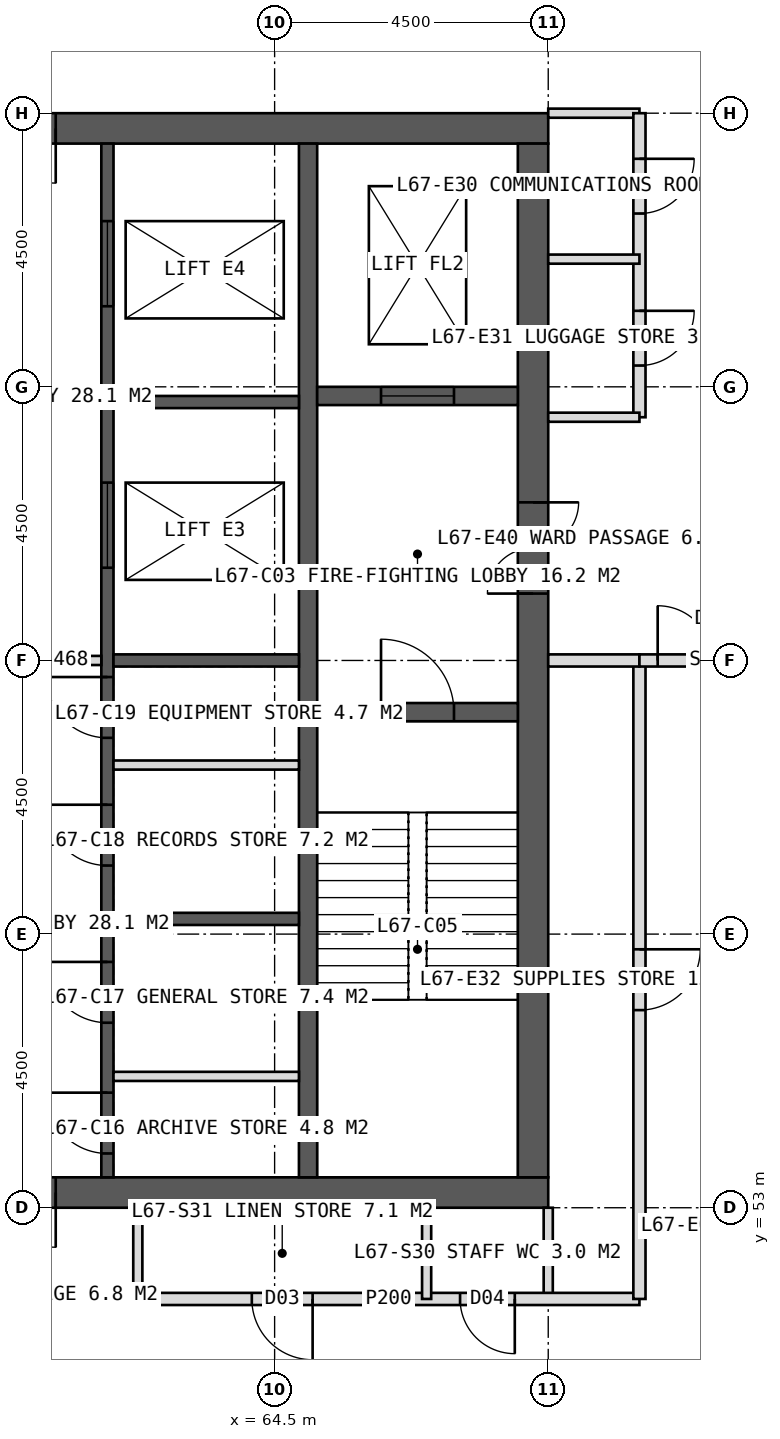
"""IFC4 building model, lengths in metres.
Left out: names, types, materials, properties, quantities, classifications, styles, units other than length and angle.
Written with IfcOpenShell. Run it as: python <this file> out.ifc"""

import sys

from ifc_helpers import new_model, si_unit, direction, frame, frame_2d, origin, place, context, subcontext, project, spatial, rectangle, extrude, element, fill, save


model = new_model("IFC4")
c1 = context("Model", 3, precision=1e-05, world=origin(), true_north=direction((0.0, 1.0)))
c2 = subcontext(c1, "Body", "Model", "MODEL_VIEW")
j1 = project(units=[si_unit("LENGTHUNIT", "METRE"), si_unit("PLANEANGLEUNIT", "RADIAN")], contexts=[c1])
p1 = place(None, origin())
s1 = spatial("IfcSite", under=j1, at=p1, CompositionType="ELEMENT")
p2 = place(p1, origin())
s2 = spatial("IfcBuilding", under=s1, at=p2, CompositionType="ELEMENT")
p3 = place(p2, frame((0.0, 0.0, 278.0)))
s3 = spatial("IfcBuildingStorey", under=s2, at=p3, CompositionType="ELEMENT", Elevation=278.0)
p4 = place(p3, frame((51.0, 70.75, 0.0), z_axis=(0.0, 0.0, 1.0), x_axis=(1.0, 0.0, 0.0)))
e1 = element("IfcWall", 1, at=p4, inside=s3, PredefinedType="SHEAR", context=c2, shape_type="SweptSolid", body=[
    extrude(rectangle(XDim=18.0, YDim=0.5, at=frame_2d((9.0, 0.0))), origin(), (0.0, 0.0, 1.0), 4.0),
])
p5 = place(p4, frame((8.1, 0.0, 0.0)))
e2 = element("IfcOpeningElement", 2, at=p5, cuts=e1, PredefinedType="OPENING", context=c2, shape_type="SweptSolid", body=[
    extrude(rectangle(XDim=1.8, YDim=2.2, at=frame_2d((0.9, 1.1))), frame((0.0, 0.26, 0.0), z_axis=(0.0, -1.0, 0.0), x_axis=(1.0, 0.0, 0.0)), (0.0, 0.0, 1.0), 0.52),
])
p6 = place(p3, frame((51.0, 53.25, 0.0), z_axis=(0.0, 0.0, 1.0), x_axis=(1.0, 0.0, 0.0)))
e3 = element("IfcWall", 3, at=p6, inside=s3, PredefinedType="SHEAR", context=c2, shape_type="SweptSolid", body=[
    extrude(rectangle(XDim=18.0, YDim=0.5, at=frame_2d((9.0, 0.0))), origin(), (0.0, 0.0, 1.0), 4.0),
])
p7 = place(p6, frame((8.1, 0.0, 0.0)))
e4 = element("IfcOpeningElement", 4, at=p7, cuts=e3, PredefinedType="OPENING", context=c2, shape_type="SweptSolid", body=[
    extrude(rectangle(XDim=1.8, YDim=2.2, at=frame_2d((0.9, 1.1))), frame((0.0, 0.26, 0.0), z_axis=(0.0, -1.0, 0.0), x_axis=(1.0, 0.0, 0.0)), (0.0, 0.0, 1.0), 0.52),
])
p8 = place(p3, frame((68.75, 53.5, 0.0), z_axis=(0.0, 0.0, 1.0), x_axis=(0.0, 1.0, 0.0)))
e5 = element("IfcWall", 5, at=p8, inside=s3, PredefinedType="SHEAR", context=c2, shape_type="SweptSolid", body=[
    extrude(rectangle(XDim=17.0, YDim=0.5, at=frame_2d((8.5, 0.0))), origin(), (0.0, 0.0, 1.0), 4.0),
])
p9 = place(p8, frame((9.6, 0.0, 0.0)))
e6 = element("IfcOpeningElement", 6, at=p9, cuts=e5, PredefinedType="OPENING", context=c2, shape_type="SweptSolid", body=[
    extrude(rectangle(XDim=1.5, YDim=2.2, at=frame_2d((0.75, 1.1))), frame((0.0, 0.26, 0.0), z_axis=(0.0, -1.0, 0.0), x_axis=(1.0, 0.0, 0.0)), (0.0, 0.0, 1.0), 0.52),
])
p10 = place(p3, frame((65.05, 53.5, 0.0), z_axis=(0.0, 0.0, 1.0), x_axis=(0.0, 1.0, 0.0)))
e7 = element("IfcWall", 7, at=p10, inside=s3, PredefinedType="SHEAR", context=c2, shape_type="SweptSolid", body=[
    extrude(rectangle(XDim=17.0, YDim=0.3, at=frame_2d((8.5, 0.0))), origin(), (0.0, 0.0, 1.0), 4.0),
])
p11 = place(p3, frame((61.75, 53.5, 0.0), z_axis=(0.0, 0.0, 1.0), x_axis=(0.0, 1.0, 0.0)))
e8 = element("IfcWall", 8, at=p11, inside=s3, PredefinedType="SHEAR", context=c2, shape_type="SweptSolid", body=[
    extrude(rectangle(XDim=17.0, YDim=0.2, at=frame_2d((8.5, 0.0))), origin(), (0.0, 0.0, 1.0), 4.0),
])
p12 = place(p11, frame((0.393, 0.0, 0.0)))
e9 = element("IfcOpeningElement", 9, at=p12, cuts=e8, PredefinedType="OPENING", context=c2, shape_type="SweptSolid", body=[
    extrude(rectangle(XDim=1.0, YDim=2.1, at=frame_2d((0.5, 1.05))), frame((0.0, 0.11, 0.0), z_axis=(0.0, -1.0, 0.0), x_axis=(1.0, 0.0, 0.0)), (0.0, 0.0, 1.0), 0.22),
])
p13 = place(p11, frame((2.542, 0.0, 0.0)))
e10 = element("IfcOpeningElement", 10, at=p13, cuts=e8, PredefinedType="OPENING", context=c2, shape_type="SweptSolid", body=[
    extrude(rectangle(XDim=1.0, YDim=2.1, at=frame_2d((0.5, 1.05))), frame((0.0, 0.11, 0.0), z_axis=(0.0, -1.0, 0.0), x_axis=(1.0, 0.0, 0.0)), (0.0, 0.0, 1.0), 0.22),
])
p14 = place(p11, frame((5.127, 0.0, 0.0)))
e11 = element("IfcOpeningElement", 11, at=p14, cuts=e8, PredefinedType="OPENING", context=c2, shape_type="SweptSolid", body=[
    extrude(rectangle(XDim=1.0, YDim=2.1, at=frame_2d((0.5, 1.05))), frame((0.0, 0.11, 0.0), z_axis=(0.0, -1.0, 0.0), x_axis=(1.0, 0.0, 0.0)), (0.0, 0.0, 1.0), 0.22),
])
p15 = place(p11, frame((7.228, 0.0, 0.0)))
e12 = element("IfcOpeningElement", 12, at=p15, cuts=e8, PredefinedType="OPENING", context=c2, shape_type="SweptSolid", body=[
    extrude(rectangle(XDim=1.0, YDim=2.1, at=frame_2d((0.5, 1.05))), frame((0.0, 0.11, 0.0), z_axis=(0.0, -1.0, 0.0), x_axis=(1.0, 0.0, 0.0)), (0.0, 0.0, 1.0), 0.22),
])
p16 = place(p11, frame((10.025, 0.0, 0.0)))
e13 = element("IfcOpeningElement", 13, at=p16, cuts=e8, PredefinedType="OPENING", context=c2, shape_type="SweptSolid", body=[
    extrude(rectangle(XDim=1.4, YDim=2.2, at=frame_2d((0.7, 1.1))), frame((0.0, 0.11, 0.0), z_axis=(0.0, -1.0, 0.0), x_axis=(1.0, 0.0, 0.0)), (0.0, 0.0, 1.0), 0.22),
])
p17 = place(p11, frame((14.325, 0.0, 0.0)))
e14 = element("IfcOpeningElement", 14, at=p17, cuts=e8, PredefinedType="OPENING", context=c2, shape_type="SweptSolid", body=[
    extrude(rectangle(XDim=1.4, YDim=2.2, at=frame_2d((0.7, 1.1))), frame((0.0, 0.11, 0.0), z_axis=(0.0, -1.0, 0.0), x_axis=(1.0, 0.0, 0.0)), (0.0, 0.0, 1.0), 0.22),
])
for number, where, z_axis, x_axis in (
    (15, (61.85, 57.75, 0.0), (0.0, 0.0, 1.0), (1.0, 0.0, 0.0)),
    (16, (61.85, 62.0, 0.0), (0.0, 0.0, 1.0), (1.0, 0.0, 0.0)),
    (17, (61.85, 66.25, 0.0), (0.0, 0.0, 1.0), (1.0, 0.0, 0.0)),
):
    element("IfcWall", number, at=place(p3, frame(where, z_axis=z_axis, x_axis=x_axis)), inside=s3, PredefinedType="SHEAR", context=c2, shape_type="SweptSolid", body=[
        extrude(rectangle(XDim=3.05, YDim=0.2, at=frame_2d((1.525, 0.0))), origin(), (0.0, 0.0, 1.0), 4.0),
    ])
p18 = place(p3, frame((65.2, 61.15, 0.0), z_axis=(0.0, 0.0, 1.0), x_axis=(1.0, 0.0, 0.0)))
e18 = element("IfcWall", 18, at=p18, inside=s3, PredefinedType="SHEAR", context=c2, shape_type="SweptSolid", body=[
    extrude(rectangle(XDim=3.3, YDim=0.3, at=frame_2d((1.65, 0.0))), origin(), (0.0, 0.0, 1.0), 4.0),
])
p19 = place(p18, frame((1.05, 0.0, 0.0)))
e19 = element("IfcOpeningElement", 19, at=p19, cuts=e18, PredefinedType="OPENING", context=c2, shape_type="SweptSolid", body=[
    extrude(rectangle(XDim=1.2, YDim=2.1, at=frame_2d((0.6, 1.05))), frame((0.0, 0.16, 0.0), z_axis=(0.0, -1.0, 0.0), x_axis=(1.0, 0.0, 0.0)), (0.0, 0.0, 1.0), 0.32),
])
p20 = place(p3, frame((65.2, 66.35, 0.0), z_axis=(0.0, 0.0, 1.0), x_axis=(1.0, 0.0, 0.0)))
e20 = element("IfcWall", 20, at=p20, inside=s3, PredefinedType="SHEAR", context=c2, shape_type="SweptSolid", body=[
    extrude(rectangle(XDim=3.3, YDim=0.3, at=frame_2d((1.65, 0.0))), origin(), (0.0, 0.0, 1.0), 4.0),
])
p21 = place(p20, frame((1.05, 0.0, 0.0)))
e21 = element("IfcOpeningElement", 21, at=p21, cuts=e20, PredefinedType="OPENING", context=c2, shape_type="SweptSolid", body=[
    extrude(rectangle(XDim=1.2, YDim=2.2, at=frame_2d((0.6, 1.1))), frame((0.0, 0.16, 0.0), z_axis=(0.0, -1.0, 0.0), x_axis=(1.0, 0.0, 0.0)), (0.0, 0.0, 1.0), 0.32),
])
p22 = place(p3, frame((69.0, 53.0, 0.0), z_axis=(0.0, 0.0, 1.0), x_axis=(0.0, -1.0, 0.0)))
e22 = element("IfcWall", 22, at=p22, inside=s3, PredefinedType="PARTITIONING", context=c2, shape_type="SweptSolid", body=[
    extrude(rectangle(XDim=1.5, YDim=0.15, at=frame_2d((0.75, 0.0))), origin(), (0.0, 0.0, 1.0), 3.75),
])
p23 = place(p3, frame((70.5, 51.5, 0.0), z_axis=(0.0, 0.0, 1.0), x_axis=(-1.0, 0.0, 0.0)))
e23 = element("IfcWall", 23, at=p23, inside=s3, PredefinedType="PARTITIONING", context=c2, shape_type="SweptSolid", body=[
    extrude(rectangle(XDim=8.25, YDim=0.2, at=frame_2d((4.125, 0.0))), origin(), (0.0, 0.0, 1.0), 3.75),
])
p24 = place(p23, frame((2.05, 0.0, 0.0)))
e24 = element("IfcOpeningElement", 24, at=p24, cuts=e23, PredefinedType="OPENING", context=c2, shape_type="SweptSolid", body=[
    extrude(rectangle(XDim=0.9, YDim=2.1, at=frame_2d((0.45, 1.05))), frame((0.0, 0.11, 0.0), z_axis=(0.0, -1.0, 0.0), x_axis=(1.0, 0.0, 0.0)), (0.0, 0.0, 1.0), 0.22),
])
p25 = place(p23, frame((5.375, 0.0, 0.0)))
e25 = element("IfcOpeningElement", 25, at=p25, cuts=e23, PredefinedType="OPENING", context=c2, shape_type="SweptSolid", body=[
    extrude(rectangle(XDim=1.0, YDim=2.1, at=frame_2d((0.5, 1.05))), frame((0.0, 0.11, 0.0), z_axis=(0.0, -1.0, 0.0), x_axis=(1.0, 0.0, 0.0)), (0.0, 0.0, 1.0), 0.22),
])
for number, where, z_axis, x_axis in (
    (26, (62.25, 53.0, 0.0), (0.0, 0.0, 1.0), (0.0, -1.0, 0.0)),
    (27, (67.0, 53.0, 0.0), (0.0, 0.0, 1.0), (0.0, -1.0, 0.0)),
    (28, (69.0, 71.0, 0.0), (0.0, 0.0, 1.0), (1.0, 0.0, 0.0)),
):
    element("IfcWall", number, at=place(p3, frame(where, z_axis=z_axis, x_axis=x_axis)), inside=s3, PredefinedType="PARTITIONING", context=c2, shape_type="SweptSolid", body=[
        extrude(rectangle(XDim=1.5, YDim=0.15, at=frame_2d((0.75, 0.0))), origin(), (0.0, 0.0, 1.0), 3.75),
    ])
p26 = place(p3, frame((70.5, 71.0, 0.0), z_axis=(0.0, 0.0, 1.0), x_axis=(0.0, -1.0, 0.0)))
e29 = element("IfcWall", 29, at=p26, inside=s3, PredefinedType="PARTITIONING", context=c2, shape_type="SweptSolid", body=[
    extrude(rectangle(XDim=5.0, YDim=0.2, at=frame_2d((2.5, 0.0))), origin(), (0.0, 0.0, 1.0), 3.75),
])
p27 = place(p26, frame((0.75, 0.0, 0.0)))
e30 = element("IfcOpeningElement", 30, at=p27, cuts=e29, PredefinedType="OPENING", context=c2, shape_type="SweptSolid", body=[
    extrude(rectangle(XDim=0.9, YDim=2.1, at=frame_2d((0.45, 1.05))), frame((0.0, 0.11, 0.0), z_axis=(0.0, -1.0, 0.0), x_axis=(1.0, 0.0, 0.0)), (0.0, 0.0, 1.0), 0.22),
])
p28 = place(p26, frame((3.25, 0.0, 0.0)))
e31 = element("IfcOpeningElement", 31, at=p28, cuts=e29, PredefinedType="OPENING", context=c2, shape_type="SweptSolid", body=[
    extrude(rectangle(XDim=0.9, YDim=2.1, at=frame_2d((0.45, 1.05))), frame((0.0, 0.11, 0.0), z_axis=(0.0, -1.0, 0.0), x_axis=(1.0, 0.0, 0.0)), (0.0, 0.0, 1.0), 0.22),
])
p29 = place(p3, frame((70.5, 62.0, 0.0), z_axis=(0.0, 0.0, 1.0), x_axis=(0.0, -1.0, 0.0)))
e32 = element("IfcWall", 32, at=p29, inside=s3, PredefinedType="PARTITIONING", context=c2, shape_type="SweptSolid", body=[
    extrude(rectangle(XDim=10.5, YDim=0.2, at=frame_2d((5.25, 0.0))), origin(), (0.0, 0.0, 1.0), 3.75),
])
p30 = place(p29, frame((4.75, 0.0, 0.0)))
e33 = element("IfcOpeningElement", 33, at=p30, cuts=e32, PredefinedType="OPENING", context=c2, shape_type="SweptSolid", body=[
    extrude(rectangle(XDim=1.0, YDim=2.1, at=frame_2d((0.5, 1.05))), frame((0.0, 0.11, 0.0), z_axis=(0.0, -1.0, 0.0), x_axis=(1.0, 0.0, 0.0)), (0.0, 0.0, 1.0), 0.22),
])
p31 = place(p3, frame((69.0, 66.0, 0.0), z_axis=(0.0, 0.0, 1.0), x_axis=(1.0, 0.0, 0.0)))
e34 = element("IfcWall", 34, at=p31, inside=s3, PredefinedType="PARTITIONING", context=c2, shape_type="SweptSolid", body=[
    extrude(rectangle(XDim=1.5, YDim=0.15, at=frame_2d((0.75, 0.0))), origin(), (0.0, 0.0, 1.0), 3.75),
])
p32 = place(p3, frame((69.0, 62.0, 0.0), z_axis=(0.0, 0.0, 1.0), x_axis=(1.0, 0.0, 0.0)))
e35 = element("IfcWall", 35, at=p32, inside=s3, PredefinedType="SOLIDWALL", context=c2, shape_type="SweptSolid", body=[
    extrude(rectangle(XDim=1.5, YDim=0.2, at=frame_2d((0.75, 0.0))), origin(), (0.0, 0.0, 1.0), 2.75),
])
p33 = place(p3, frame((69.0, 68.6, 0.0), z_axis=(0.0, 0.0, 1.0), x_axis=(1.0, 0.0, 0.0)))
e36 = element("IfcWall", 36, at=p33, inside=s3, PredefinedType="PARTITIONING", context=c2, shape_type="SweptSolid", body=[
    extrude(rectangle(XDim=1.5, YDim=0.15, at=frame_2d((0.75, 0.0))), origin(), (0.0, 0.0, 1.0), 3.75),
])
p34 = place(p3, frame((70.5, 62.0, 0.0), z_axis=(0.0, 0.0, 1.0), x_axis=(1.0, 0.0, 0.0)))
e37 = element("IfcWall", 37, at=p34, inside=s3, PredefinedType="SOLIDWALL", context=c2, shape_type="SweptSolid", body=[
    extrude(rectangle(XDim=2.6, YDim=0.2, at=frame_2d((1.3, 0.0))), origin(), (0.0, 0.0, 1.0), 2.75),
])
p35 = place(p34, frame((0.3, 0.0, 0.0)))
e38 = element("IfcOpeningElement", 38, at=p35, cuts=e37, PredefinedType="OPENING", context=c2, shape_type="SweptSolid", body=[
    extrude(rectangle(XDim=1.8, YDim=2.2, at=frame_2d((0.9, 1.1))), frame((0.0, 0.11, 0.0), z_axis=(0.0, -1.0, 0.0), x_axis=(1.0, 0.0, 0.0)), (0.0, 0.0, 1.0), 0.22),
])
for number, where, z_axis, x_axis in (
    (39, (61.85, 55.16, 0.0), (0.0, 0.0, 1.0), (1.0, 0.0, 0.0)),
    (40, (61.85, 60.28, 0.0), (0.0, 0.0, 1.0), (1.0, 0.0, 0.0)),
):
    element("IfcWall", number, at=place(p3, frame(where, z_axis=z_axis, x_axis=x_axis)), inside=s3, PredefinedType="PARTITIONING", context=c2, shape_type="SweptSolid", body=[
        extrude(rectangle(XDim=3.05, YDim=0.15, at=frame_2d((1.525, 0.0))), origin(), (0.0, 0.0, 1.0), 3.75),
    ])
p36 = place(p3, frame((58.35, 62.0, 0.0), z_axis=(0.0, 0.0, 1.0), x_axis=(1.0, 0.0, 0.0)))
e41 = element("IfcWall", 41, at=p36, inside=s3, PredefinedType="PARTITIONING", context=c2, shape_type="SweptSolid", body=[
    extrude(rectangle(XDim=3.3, YDim=0.15, at=frame_2d((1.65, 0.0))), origin(), (0.0, 0.0, 1.0), 3.75),
])
p37 = place(p24, origin())
e42 = element("IfcDoor", 42, at=p37, inside=s3, OperationType="SINGLE_SWING_LEFT", PredefinedType="DOOR", context=c2, shape_type="SweptSolid", body=[
    extrude(rectangle(XDim=0.9, YDim=2.1, at=frame_2d((0.45, 1.05))), frame((0.0, 0.025, 0.0), z_axis=(0.0, -1.0, 0.0), x_axis=(1.0, 0.0, 0.0)), (0.0, 0.0, 1.0), 0.05),
])
fill(e24, e42)
p38 = place(p25, origin())
e43 = element("IfcDoor", 43, at=p38, inside=s3, OperationType="SINGLE_SWING_LEFT", PredefinedType="DOOR", context=c2, shape_type="SweptSolid", body=[
    extrude(rectangle(XDim=1.0, YDim=2.1, at=frame_2d((0.5, 1.05))), frame((0.0, 0.025, 0.0), z_axis=(0.0, -1.0, 0.0), x_axis=(1.0, 0.0, 0.0)), (0.0, 0.0, 1.0), 0.05),
])
fill(e25, e43)
p39 = place(p27, origin())
e44 = element("IfcDoor", 44, at=p39, inside=s3, OperationType="SINGLE_SWING_LEFT", PredefinedType="DOOR", context=c2, shape_type="SweptSolid", body=[
    extrude(rectangle(XDim=0.9, YDim=2.1, at=frame_2d((0.45, 1.05))), frame((0.0, 0.025, 0.0), z_axis=(0.0, -1.0, 0.0), x_axis=(1.0, 0.0, 0.0)), (0.0, 0.0, 1.0), 0.05),
])
fill(e30, e44)
p40 = place(p28, origin())
e45 = element("IfcDoor", 45, at=p40, inside=s3, OperationType="SINGLE_SWING_LEFT", PredefinedType="DOOR", context=c2, shape_type="SweptSolid", body=[
    extrude(rectangle(XDim=0.9, YDim=2.1, at=frame_2d((0.45, 1.05))), frame((0.0, 0.025, 0.0), z_axis=(0.0, -1.0, 0.0), x_axis=(1.0, 0.0, 0.0)), (0.0, 0.0, 1.0), 0.05),
])
fill(e31, e45)
p41 = place(p30, origin())
e46 = element("IfcDoor", 46, at=p41, inside=s3, OperationType="SINGLE_SWING_LEFT", PredefinedType="DOOR", context=c2, shape_type="SweptSolid", body=[
    extrude(rectangle(XDim=1.0, YDim=2.1, at=frame_2d((0.5, 1.05))), frame((0.0, 0.025, 0.0), z_axis=(0.0, -1.0, 0.0), x_axis=(1.0, 0.0, 0.0)), (0.0, 0.0, 1.0), 0.05),
])
fill(e33, e46)
p42 = place(p35, origin())
e47 = element("IfcDoor", 47, at=p42, inside=s3, OperationType="DOUBLE_DOOR_DOUBLE_SWING", PredefinedType="DOOR", context=c2, shape_type="SweptSolid", body=[
    extrude(rectangle(XDim=1.8, YDim=2.2, at=frame_2d((0.9, 1.1))), frame((0.0, 0.025, 0.0), z_axis=(0.0, -1.0, 0.0), x_axis=(1.0, 0.0, 0.0)), (0.0, 0.0, 1.0), 0.05),
])
fill(e38, e47)
p43 = place(p5, origin())
e48 = element("IfcDoor", 48, at=p43, inside=s3, OperationType="DOUBLE_DOOR_SINGLE_SWING", PredefinedType="DOOR", context=c2, shape_type="SweptSolid", body=[
    extrude(rectangle(XDim=1.8, YDim=2.2, at=frame_2d((0.9, 1.1))), frame((0.0, 0.025, 0.0), z_axis=(0.0, -1.0, 0.0), x_axis=(1.0, 0.0, 0.0)), (0.0, 0.0, 1.0), 0.05),
])
fill(e2, e48)
p44 = place(p9, origin())
e49 = element("IfcDoor", 49, at=p44, inside=s3, OperationType="DOUBLE_DOOR_SINGLE_SWING", PredefinedType="DOOR", context=c2, shape_type="SweptSolid", body=[
    extrude(rectangle(XDim=1.5, YDim=2.2, at=frame_2d((0.75, 1.1))), frame((0.0, 0.025, 0.0), z_axis=(0.0, -1.0, 0.0), x_axis=(1.0, 0.0, 0.0)), (0.0, 0.0, 1.0), 0.05),
])
fill(e6, e49)
p45 = place(p19, origin())
e50 = element("IfcDoor", 50, at=p45, inside=s3, OperationType="SINGLE_SWING_LEFT", PredefinedType="DOOR", context=c2, shape_type="SweptSolid", body=[
    extrude(rectangle(XDim=1.2, YDim=2.1, at=frame_2d((0.6, 1.05))), frame((0.0, 0.025, 0.0), z_axis=(0.0, -1.0, 0.0), x_axis=(1.0, 0.0, 0.0)), (0.0, 0.0, 1.0), 0.05),
])
fill(e19, e50)
p46 = place(p21, origin())
e51 = element("IfcDoor", 51, at=p46, inside=s3, OperationType="SLIDING_TO_LEFT", PredefinedType="DOOR", context=c2, shape_type="SweptSolid", body=[
    extrude(rectangle(XDim=1.2, YDim=2.2, at=frame_2d((0.6, 1.1))), frame((0.0, 0.025, 0.0), z_axis=(0.0, -1.0, 0.0), x_axis=(1.0, 0.0, 0.0)), (0.0, 0.0, 1.0), 0.05),
])
fill(e21, e51)
p47 = place(p12, origin())
e52 = element("IfcDoor", 52, at=p47, inside=s3, OperationType="SINGLE_SWING_RIGHT", PredefinedType="DOOR", context=c2, shape_type="SweptSolid", body=[
    extrude(rectangle(XDim=1.0, YDim=2.1, at=frame_2d((0.5, 1.05))), frame((0.0, 0.025, 0.0), z_axis=(0.0, -1.0, 0.0), x_axis=(1.0, 0.0, 0.0)), (0.0, 0.0, 1.0), 0.05),
])
fill(e9, e52)
p48 = place(p13, origin())
e53 = element("IfcDoor", 53, at=p48, inside=s3, OperationType="SINGLE_SWING_RIGHT", PredefinedType="DOOR", context=c2, shape_type="SweptSolid", body=[
    extrude(rectangle(XDim=1.0, YDim=2.1, at=frame_2d((0.5, 1.05))), frame((0.0, 0.025, 0.0), z_axis=(0.0, -1.0, 0.0), x_axis=(1.0, 0.0, 0.0)), (0.0, 0.0, 1.0), 0.05),
])
fill(e10, e53)
p49 = place(p14, origin())
e54 = element("IfcDoor", 54, at=p49, inside=s3, OperationType="SINGLE_SWING_RIGHT", PredefinedType="DOOR", context=c2, shape_type="SweptSolid", body=[
    extrude(rectangle(XDim=1.0, YDim=2.1, at=frame_2d((0.5, 1.05))), frame((0.0, 0.025, 0.0), z_axis=(0.0, -1.0, 0.0), x_axis=(1.0, 0.0, 0.0)), (0.0, 0.0, 1.0), 0.05),
])
fill(e11, e54)
p50 = place(p15, origin())
e55 = element("IfcDoor", 55, at=p50, inside=s3, OperationType="SINGLE_SWING_RIGHT", PredefinedType="DOOR", context=c2, shape_type="SweptSolid", body=[
    extrude(rectangle(XDim=1.0, YDim=2.1, at=frame_2d((0.5, 1.05))), frame((0.0, 0.025, 0.0), z_axis=(0.0, -1.0, 0.0), x_axis=(1.0, 0.0, 0.0)), (0.0, 0.0, 1.0), 0.05),
])
fill(e12, e55)
p51 = place(p16, origin())
e56 = element("IfcDoor", 56, at=p51, inside=s3, OperationType="SLIDING_TO_LEFT", PredefinedType="DOOR", context=c2, shape_type="SweptSolid", body=[
    extrude(rectangle(XDim=1.4, YDim=2.2, at=frame_2d((0.7, 1.1))), frame((0.0, 0.025, 0.0), z_axis=(0.0, -1.0, 0.0), x_axis=(1.0, 0.0, 0.0)), (0.0, 0.0, 1.0), 0.05),
])
fill(e13, e56)
p52 = place(p17, origin())
e57 = element("IfcDoor", 57, at=p52, inside=s3, OperationType="SLIDING_TO_LEFT", PredefinedType="DOOR", context=c2, shape_type="SweptSolid", body=[
    extrude(rectangle(XDim=1.4, YDim=2.2, at=frame_2d((0.7, 1.1))), frame((0.0, 0.025, 0.0), z_axis=(0.0, -1.0, 0.0), x_axis=(1.0, 0.0, 0.0)), (0.0, 0.0, 1.0), 0.05),
])
fill(e14, e57)
p53 = place(p7, origin())
e58 = element("IfcDoor", 58, at=p53, inside=s3, OperationType="DOUBLE_DOOR_SINGLE_SWING", PredefinedType="DOOR", context=c2, shape_type="SweptSolid", body=[
    extrude(rectangle(XDim=1.8, YDim=2.2, at=frame_2d((0.9, 1.1))), frame((0.0, 0.025, 0.0), z_axis=(0.0, -1.0, 0.0), x_axis=(1.0, 0.0, 0.0)), (0.0, 0.0, 1.0), 0.05),
])
fill(e4, e58)
save(model, sys.argv[1])
